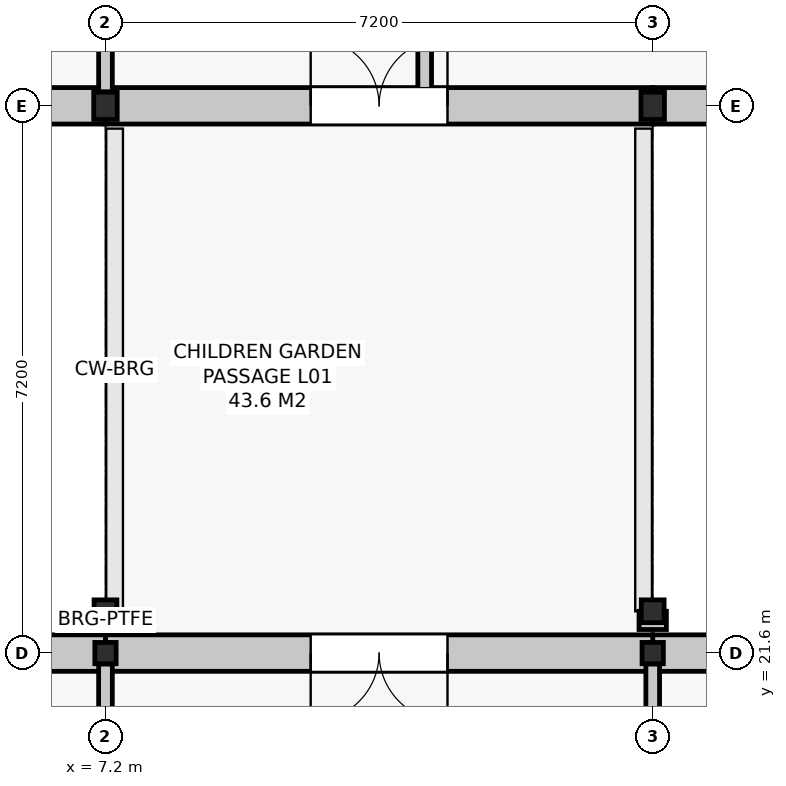
"""IFC4 building model, lengths in metres.
Left out: names, types, materials, properties, quantities, classifications, styles, units other than length and angle.
Written with IfcOpenShell. Run it as: python <this file> out.ifc"""

import sys

from ifc_helpers import new_model, si_unit, direction, frame, frame_2d, origin, origin_2d, place, context, subcontext, project, spatial, rectangle, i_section, extrude, element, fill, save


model = new_model("IFC4")
c1 = context("Model", 3, precision=1e-05, world=origin(), true_north=direction((0.0, 1.0)))
c2 = subcontext(c1, "Body", "Model", "MODEL_VIEW")
j1 = project(units=[si_unit("LENGTHUNIT", "METRE"), si_unit("PLANEANGLEUNIT", "RADIAN")], contexts=[c1])
p1 = place(None, origin())
s1 = spatial("IfcSite", under=j1, at=p1, CompositionType="ELEMENT")
p2 = place(p1, origin())
s2 = spatial("IfcBuilding", under=s1, at=p2, CompositionType="ELEMENT")
p3 = place(p2, frame((0.0, 0.0, 5.4)))
s3 = spatial("IfcBuildingStorey", under=s2, at=p3, CompositionType="ELEMENT", Elevation=5.4)
for number, where, z_axis, x_axis in (
    (1, (7.2, 21.6, 0.0), (0.0, 0.0, 1.0), (1.0, 0.0, 0.0)),
    (2, (14.4, 21.6, 0.0), (0.0, 0.0, 1.0), (1.0, 0.0, 0.0)),
):
    element("IfcColumn", number, at=place(p3, frame(where, z_axis=z_axis, x_axis=x_axis)), inside=s3, PredefinedType="COLUMN", context=c2, shape_type="SweptSolid", body=[
        extrude(i_section(OverallWidth=0.28, OverallDepth=0.28, WebThickness=0.01, FlangeThickness=0.018, FilletRadius=0.024, at=origin_2d()), origin(), (0.0, 0.0, 1.0), 4.8),
    ])
for number, where, z_axis, x_axis in (
    (3, (7.2, 28.8, 0.0), (0.0, 0.0, 1.0), (1.0, 0.0, 0.0)),
    (4, (14.4, 28.8, 0.0), (0.0, 0.0, 1.0), (1.0, 0.0, 0.0)),
):
    element("IfcColumn", number, at=place(p3, frame(where, z_axis=z_axis, x_axis=x_axis)), inside=s3, PredefinedType="COLUMN", context=c2, shape_type="SweptSolid", body=[
        extrude(i_section(OverallWidth=0.309, OverallDepth=0.359, WebThickness=0.021, FlangeThickness=0.035, FilletRadius=0.027, at=origin_2d()), origin(), (0.0, 0.0, 1.0), 4.8),
    ])
for number, where, z_axis, x_axis in (
    (5, (7.2, 22.15, 0.0), (0.0, 0.0, 1.0), (1.0, 0.0, 0.0)),
    (6, (14.4, 22.15, 0.0), (0.0, 0.0, 1.0), (1.0, 0.0, 0.0)),
):
    element("IfcColumn", number, at=place(p3, frame(where, z_axis=z_axis, x_axis=x_axis)), inside=s3, PredefinedType="COLUMN", context=c2, shape_type="SweptSolid", body=[
        extrude(i_section(OverallWidth=0.3, OverallDepth=0.3, WebThickness=0.011, FlangeThickness=0.019, FilletRadius=0.027, at=origin_2d()), origin(), (0.0, 0.0, 1.0), 4.8),
    ])
p4 = place(p3, frame((21.6, 21.6, 0.0), z_axis=(0.0, 0.0, 1.0), x_axis=(-1.0, 0.0, 0.0)))
e7 = element("IfcWall", 7, at=p4, inside=s3, PredefinedType="SOLIDWALL", context=c2, shape_type="SweptSolid", body=[
    extrude(rectangle(XDim=7.2, YDim=0.48, at=frame_2d((3.6, 0.0))), origin(), (0.0, 0.0, 1.0), 3.8),
])
p5 = place(p4, frame((2.55, 0.0, 0.9)))
e8 = element("IfcOpeningElement", 8, at=p5, cuts=e7, PredefinedType="OPENING", context=c2, shape_type="SweptSolid", body=[
    extrude(rectangle(XDim=2.1, YDim=2.1, at=frame_2d((1.05, 1.05))), frame((0.0, 0.252, 0.0), z_axis=(0.0, -1.0, 0.0), x_axis=(1.0, 0.0, 0.0)), (0.0, 0.0, 1.0), 0.504),
])
p6 = place(p3, frame((14.4, 21.6, 0.0), z_axis=(0.0, 0.0, 1.0), x_axis=(-1.0, 0.0, 0.0)))
e9 = element("IfcWall", 9, at=p6, inside=s3, PredefinedType="SOLIDWALL", context=c2, shape_type="SweptSolid", body=[
    extrude(rectangle(XDim=7.2, YDim=0.48, at=frame_2d((3.6, 0.0))), origin(), (0.0, 0.0, 1.0), 3.8),
])
p7 = place(p6, frame((2.7, 0.0, 0.0)))
e10 = element("IfcOpeningElement", 10, at=p7, cuts=e9, PredefinedType="OPENING", context=c2, shape_type="SweptSolid", body=[
    extrude(rectangle(XDim=1.8, YDim=2.3, at=frame_2d((0.9, 1.15))), frame((0.0, 0.252, 0.0), z_axis=(0.0, -1.0, 0.0), x_axis=(1.0, 0.0, 0.0)), (0.0, 0.0, 1.0), 0.504),
])
p8 = place(p3, frame((7.2, 21.6, 0.0), z_axis=(0.0, 0.0, 1.0), x_axis=(-1.0, 0.0, 0.0)))
e11 = element("IfcWall", 11, at=p8, inside=s3, PredefinedType="SOLIDWALL", context=c2, shape_type="SweptSolid", body=[
    extrude(rectangle(XDim=7.056, YDim=0.48, at=frame_2d((3.528, 0.0))), origin(), (0.0, 0.0, 1.0), 3.8),
])
p9 = place(p8, frame((2.55, 0.0, 0.9)))
e12 = element("IfcOpeningElement", 12, at=p9, cuts=e11, PredefinedType="OPENING", context=c2, shape_type="SweptSolid", body=[
    extrude(rectangle(XDim=2.1, YDim=2.1, at=frame_2d((1.05, 1.05))), frame((0.0, 0.252, 0.0), z_axis=(0.0, -1.0, 0.0), x_axis=(1.0, 0.0, 0.0)), (0.0, 0.0, 1.0), 0.504),
])
p10 = place(p3, frame((0.158, 28.8, 0.0), z_axis=(0.0, 0.0, 1.0), x_axis=(1.0, 0.0, 0.0)))
e13 = element("IfcWall", 13, at=p10, inside=s3, PredefinedType="SOLIDWALL", context=c2, shape_type="SweptSolid", body=[
    extrude(rectangle(XDim=7.042, YDim=0.48, at=frame_2d((3.521, 0.0))), origin(), (0.0, 0.0, 1.0), 3.78),
])
p11 = place(p10, frame((2.671, 0.0, 1.65)))
e14 = element("IfcOpeningElement", 14, at=p11, cuts=e13, PredefinedType="OPENING", context=c2, shape_type="SweptSolid", body=[
    extrude(rectangle(XDim=1.7, YDim=0.95, at=frame_2d((0.85, 0.475))), frame((0.0, 0.252, 0.0), z_axis=(0.0, -1.0, 0.0), x_axis=(1.0, 0.0, 0.0)), (0.0, 0.0, 1.0), 0.504),
])
p12 = place(p3, frame((7.2, 28.8, 0.0), z_axis=(0.0, 0.0, 1.0), x_axis=(1.0, 0.0, 0.0)))
e15 = element("IfcWall", 15, at=p12, inside=s3, PredefinedType="SOLIDWALL", context=c2, shape_type="SweptSolid", body=[
    extrude(rectangle(XDim=7.2, YDim=0.48, at=frame_2d((3.6, 0.0))), origin(), (0.0, 0.0, 1.0), 3.78),
])
p13 = place(p12, frame((2.7, 0.0, 0.0)))
e16 = element("IfcOpeningElement", 16, at=p13, cuts=e15, PredefinedType="OPENING", context=c2, shape_type="SweptSolid", body=[
    extrude(rectangle(XDim=1.8, YDim=2.3, at=frame_2d((0.9, 1.15))), frame((0.0, 0.252, 0.0), z_axis=(0.0, -1.0, 0.0), x_axis=(1.0, 0.0, 0.0)), (0.0, 0.0, 1.0), 0.504),
])
p14 = place(p3, frame((14.4, 28.8, 0.0), z_axis=(0.0, 0.0, 1.0), x_axis=(1.0, 0.0, 0.0)))
e17 = element("IfcWall", 17, at=p14, inside=s3, PredefinedType="SOLIDWALL", context=c2, shape_type="SweptSolid", body=[
    extrude(rectangle(XDim=7.042, YDim=0.48, at=frame_2d((3.521, 0.0))), origin(), (0.0, 0.0, 1.0), 3.78),
])
p15 = place(p14, frame((3.0, 0.0, 0.95)))
e18 = element("IfcOpeningElement", 18, at=p15, cuts=e17, PredefinedType="OPENING", context=c2, shape_type="SweptSolid", body=[
    extrude(rectangle(XDim=1.2, YDim=2.15, at=frame_2d((0.6, 1.075))), frame((0.0, 0.252, 0.0), z_axis=(0.0, -1.0, 0.0), x_axis=(1.0, 0.0, 0.0)), (0.0, 0.0, 1.0), 0.504),
])
p16 = place(p3, frame((7.2, 17.877, 0.0), z_axis=(0.0, 0.0, 1.0), x_axis=(0.0, 1.0, 0.0)))
e19 = element("IfcWall", 19, at=p16, inside=s3, PredefinedType="PARTITIONING", context=c2, shape_type="SweptSolid", body=[
    extrude(rectangle(XDim=3.579, YDim=0.18, at=frame_2d((1.79, 0.0))), origin(), (0.0, 0.0, 1.0), 4.065),
])
p17 = place(p16, frame((1.29, 0.0, 0.0)))
e20 = element("IfcOpeningElement", 20, at=p17, cuts=e19, PredefinedType="OPENING", context=c2, shape_type="SweptSolid", body=[
    extrude(rectangle(XDim=1.0, YDim=2.15, at=frame_2d((0.5, 1.075))), frame((0.0, 0.102, 0.0), z_axis=(0.0, -1.0, 0.0), x_axis=(1.0, 0.0, 0.0)), (0.0, 0.0, 1.0), 0.204),
])
p18 = place(p3, frame((14.4, 14.544, 0.0), z_axis=(0.0, 0.0, 1.0), x_axis=(0.0, 1.0, 0.0)))
e21 = element("IfcWall", 21, at=p18, inside=s3, PredefinedType="PARTITIONING", context=c2, shape_type="SweptSolid", body=[
    extrude(rectangle(XDim=6.912, YDim=0.18, at=frame_2d((3.456, 0.0))), origin(), (0.0, 0.0, 1.0), 4.065),
])
p19 = place(p18, frame((2.681, 0.0, 0.0)))
e22 = element("IfcOpeningElement", 22, at=p19, cuts=e21, PredefinedType="OPENING", context=c2, shape_type="SweptSolid", body=[
    extrude(rectangle(XDim=1.55, YDim=2.2, at=frame_2d((0.775, 1.1))), frame((0.0, 0.102, 0.0), z_axis=(0.0, -1.0, 0.0), x_axis=(1.0, 0.0, 0.0)), (0.0, 0.0, 1.0), 0.204),
])
p20 = place(p3, frame((7.2, 28.983, 0.0), z_axis=(0.0, 0.0, 1.0), x_axis=(0.0, 1.0, 0.0)))
e23 = element("IfcWall", 23, at=p20, inside=s3, PredefinedType="PARTITIONING", context=c2, shape_type="SweptSolid", body=[
    extrude(rectangle(XDim=6.824, YDim=0.18, at=frame_2d((3.412, 0.0))), origin(), (0.0, 0.0, 1.0), 3.945),
])
p21 = place(p20, frame((2.937, 0.0, 0.0)))
e24 = element("IfcOpeningElement", 24, at=p21, cuts=e23, PredefinedType="OPENING", context=c2, shape_type="SweptSolid", body=[
    extrude(rectangle(XDim=0.95, YDim=2.15, at=frame_2d((0.475, 1.075))), frame((0.0, 0.102, 0.0), z_axis=(0.0, -1.0, 0.0), x_axis=(1.0, 0.0, 0.0)), (0.0, 0.0, 1.0), 0.204),
])
p22 = place(p3, frame((11.4, 28.855, 0.0), z_axis=(0.0, 0.0, 1.0), x_axis=(0.0, 1.0, 0.0)))
e25 = element("IfcWall", 25, at=p22, inside=s3, PredefinedType="PARTITIONING", context=c2, shape_type="SweptSolid", body=[
    extrude(rectangle(XDim=35.853, YDim=0.18, at=frame_2d((17.927, 0.0))), origin(), (0.0, 0.0, 1.0), 3.885),
])
p23 = place(p22, frame((17.102, 0.0, 0.0)))
e26 = element("IfcOpeningElement", 26, at=p23, cuts=e25, PredefinedType="OPENING", context=c2, shape_type="SweptSolid", body=[
    extrude(rectangle(XDim=1.65, YDim=2.25, at=frame_2d((0.825, 1.125))), frame((0.0, 0.102, 0.0), z_axis=(0.0, -1.0, 0.0), x_axis=(1.0, 0.0, 0.0)), (0.0, 0.0, 1.0), 0.204),
])
p24 = place(p7, origin())
e27 = element("IfcDoor", 27, at=p24, inside=s3, OperationType="DOUBLE_DOOR_SINGLE_SWING", PredefinedType="DOOR", context=c2, shape_type="SweptSolid", body=[
    extrude(rectangle(XDim=1.8, YDim=2.3, at=frame_2d((0.9, 1.15))), frame((0.0, 0.025, 0.0), z_axis=(0.0, -1.0, 0.0), x_axis=(1.0, 0.0, 0.0)), (0.0, 0.0, 1.0), 0.05),
])
fill(e10, e27)
p25 = place(p13, origin())
e28 = element("IfcDoor", 28, at=p25, inside=s3, OperationType="DOUBLE_DOOR_SINGLE_SWING", PredefinedType="DOOR", context=c2, shape_type="SweptSolid", body=[
    extrude(rectangle(XDim=1.8, YDim=2.3, at=frame_2d((0.9, 1.15))), frame((0.0, 0.025, 0.0), z_axis=(0.0, -1.0, 0.0), x_axis=(1.0, 0.0, 0.0)), (0.0, 0.0, 1.0), 0.05),
])
fill(e16, e28)
save(model, sys.argv[1])
